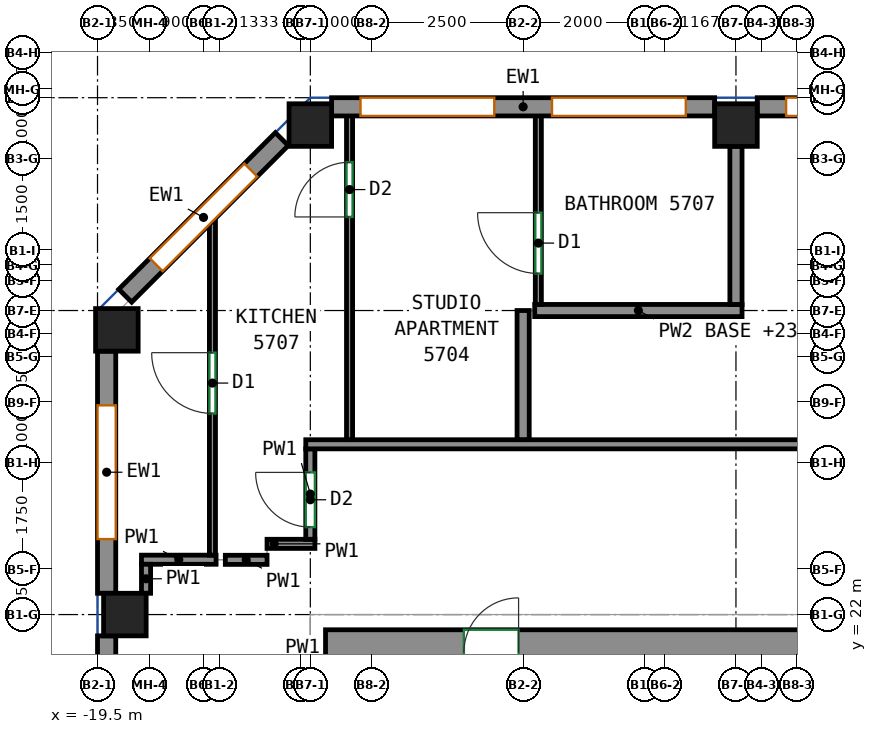
"""IFC4 building model, lengths in metres.
Left out: names, types, materials, properties, quantities, classifications, styles, units other than length and angle.
Written with IfcOpenShell. Run it as: python <this file> out.ifc"""

import sys

from ifc_helpers import new_model, si_unit, direction, frame, frame_2d, origin, origin_2d, place, context, subcontext, project, spatial, rectangle, extrude, source, transform, mapped, element, fill, save


model = new_model("IFC4")
c1 = context("Model", 3, precision=1e-05, world=origin(), true_north=direction((0.0, 1.0)))
c2 = subcontext(c1, "Body", "Model", "MODEL_VIEW")
j1 = project(units=[si_unit("LENGTHUNIT", "METRE"), si_unit("PLANEANGLEUNIT", "RADIAN")], contexts=[c1])
p1 = place(None, origin())
s1 = spatial("IfcSite", under=j1, at=p1, CompositionType="ELEMENT")
p2 = place(p1, origin())
s2 = spatial("IfcBuilding", under=s1, at=p2, CompositionType="ELEMENT")
p3 = place(p2, frame((0.0, 0.0, 239.0)))
s3 = spatial("IfcBuildingStorey", under=s2, at=p3, CompositionType="ELEMENT", Elevation=239.0)
m1 = source(origin(), c2, "Body", "SweptSolid", [
    extrude(rectangle(XDim=0.7, YDim=0.7, at=origin_2d()), origin(), (0.0, 0.0, 1.0), 3.12),
])
for number, where, z_axis, x_axis in (
    (1, (-19.182, 26.682, 0.0), (0.0, 0.0, 1.0), (1.0, 0.0, 0.0)),
    (2, (-19.05, 22.0, 0.0), (0.0, 0.0, 1.0), (1.0, 0.0, 0.0)),
    (3, (-16.0, 30.05, 0.0), (0.0, 0.0, 1.0), (1.0, 0.0, 0.0)),
    (4, (-9.0, 30.05, 0.0), (0.0, 0.0, 1.0), (1.0, 0.0, 0.0)),
):
    element("IfcColumn", number, at=place(p3, frame(where, z_axis=z_axis, x_axis=x_axis)), inside=s3, PredefinedType="COLUMN", context=c2, shape_type="MappedRepresentation", body=[
        mapped(m1, transform((0.0, 0.0, 0.0))),
    ])
m2 = source(origin(), c2, "Body", "SweptSolid", [
    extrude(rectangle(XDim=33.6, YDim=0.75, at=frame_2d((16.8, 0.0))), origin(), (0.0, 0.0, 1.0), 3.12),
])
p4 = place(p3, frame((-15.75, 21.375, 0.0), z_axis=(0.0, 0.0, 1.0), x_axis=(1.0, 0.0, 0.0)))
e5 = element("IfcWall", 5, at=p4, inside=s3, PredefinedType="SHEAR", context=c2, shape_type="MappedRepresentation", body=[
    mapped(m2, transform((0.0, 0.0, 0.0))),
])
p5 = place(p4, frame((8.27, 0.0, 0.0)))
e6 = element("IfcOpeningElement", 6, at=p5, cuts=e5, PredefinedType="OPENING", context=c2, shape_type="SweptSolid", body=[
    extrude(rectangle(XDim=0.9, YDim=2.1, at=frame_2d((0.45, 1.05))), frame((0.0, 0.385, 0.0), z_axis=(0.0, -1.0, 0.0), x_axis=(1.0, 0.0, 0.0)), (0.0, 0.0, 1.0), 0.77),
])
p6 = place(p4, frame((14.97, 0.0, 0.0)))
e7 = element("IfcOpeningElement", 7, at=p6, cuts=e5, PredefinedType="OPENING", context=c2, shape_type="SweptSolid", body=[
    extrude(rectangle(XDim=0.9, YDim=2.1, at=frame_2d((0.45, 1.05))), frame((0.0, 0.385, 0.0), z_axis=(0.0, -1.0, 0.0), x_axis=(1.0, 0.0, 0.0)), (0.0, 0.0, 1.0), 0.77),
])
p7 = place(p4, frame((19.794, 0.0, 0.0)))
e8 = element("IfcOpeningElement", 8, at=p7, cuts=e5, PredefinedType="OPENING", context=c2, shape_type="SweptSolid", body=[
    extrude(rectangle(XDim=0.9, YDim=2.1, at=frame_2d((0.45, 1.05))), frame((0.0, 0.385, 0.0), z_axis=(0.0, -1.0, 0.0), x_axis=(1.0, 0.0, 0.0)), (0.0, 0.0, 1.0), 0.77),
])
p8 = place(p4, frame((25.154, 0.0, 0.0)))
e9 = element("IfcOpeningElement", 9, at=p8, cuts=e5, PredefinedType="OPENING", context=c2, shape_type="SweptSolid", body=[
    extrude(rectangle(XDim=0.9, YDim=2.1, at=frame_2d((0.45, 1.05))), frame((0.0, 0.385, 0.0), z_axis=(0.0, -1.0, 0.0), x_axis=(1.0, 0.0, 0.0)), (0.0, 0.0, 1.0), 0.77),
])
p9 = place(p4, frame((2.275, 0.0, 0.0)))
e10 = element("IfcOpeningElement", 10, at=p9, cuts=e5, PredefinedType="OPENING", context=c2, shape_type="SweptSolid", body=[
    extrude(rectangle(XDim=0.9, YDim=2.1, at=frame_2d((0.45, 1.05))), frame((0.0, 0.385, 0.0), z_axis=(0.0, -1.0, 0.0), x_axis=(1.0, 0.0, 0.0)), (0.0, 0.0, 1.0), 0.77),
])
p10 = place(p4, frame((30.425, 0.0, 0.0)))
e11 = element("IfcOpeningElement", 11, at=p10, cuts=e5, PredefinedType="OPENING", context=c2, shape_type="SweptSolid", body=[
    extrude(rectangle(XDim=0.9, YDim=2.1, at=frame_2d((0.45, 1.05))), frame((0.0, 0.385, 0.0), z_axis=(0.0, -1.0, 0.0), x_axis=(1.0, 0.0, 0.0)), (0.0, 0.0, 1.0), 0.77),
])
m3 = source(origin(), c2, "Body", "SweptSolid", [
    extrude(rectangle(XDim=6.3, YDim=0.3, at=frame_2d((3.15, 0.0))), origin(), (0.0, 0.0, 1.0), 3.12),
])
p11 = place(p3, frame((-2.35, 30.35, 0.0), z_axis=(0.0, 0.0, 1.0), x_axis=(-1.0, 0.0, 0.0)))
e12 = element("IfcWall", 12, at=p11, inside=s3, PredefinedType="SOLIDWALL", context=c2, shape_type="MappedRepresentation", body=[
    mapped(m3, transform((0.0, 0.0, 0.0))),
])
p12 = place(p11, frame((0.475, 0.0, 0.8)))
e13 = element("IfcOpeningElement", 13, at=p12, cuts=e12, PredefinedType="OPENING", context=c2, shape_type="SweptSolid", body=[
    extrude(rectangle(XDim=2.2, YDim=2.05, at=frame_2d((1.1, 1.025))), frame((0.0, 0.16, 0.0), z_axis=(0.0, -1.0, 0.0), x_axis=(1.0, 0.0, 0.0)), (0.0, 0.0, 1.0), 0.32),
])
p13 = place(p11, frame((3.625, 0.0, 0.8)))
e14 = element("IfcOpeningElement", 14, at=p13, cuts=e12, PredefinedType="OPENING", context=c2, shape_type="SweptSolid", body=[
    extrude(rectangle(XDim=2.2, YDim=2.05, at=frame_2d((1.1, 1.025))), frame((0.0, 0.16, 0.0), z_axis=(0.0, -1.0, 0.0), x_axis=(1.0, 0.0, 0.0)), (0.0, 0.0, 1.0), 0.32),
])
p14 = place(p3, frame((-9.35, 30.35, 0.0), z_axis=(0.0, 0.0, 1.0), x_axis=(-1.0, 0.0, 0.0)))
e15 = element("IfcWall", 15, at=p14, inside=s3, PredefinedType="SOLIDWALL", context=c2, shape_type="MappedRepresentation", body=[
    mapped(m3, transform((0.0, 0.0, 0.0))),
])
p15 = place(p14, frame((0.475, 0.0, 0.8)))
e16 = element("IfcOpeningElement", 16, at=p15, cuts=e15, PredefinedType="OPENING", context=c2, shape_type="SweptSolid", body=[
    extrude(rectangle(XDim=2.2, YDim=2.05, at=frame_2d((1.1, 1.025))), frame((0.0, 0.16, 0.0), z_axis=(0.0, -1.0, 0.0), x_axis=(1.0, 0.0, 0.0)), (0.0, 0.0, 1.0), 0.32),
])
p16 = place(p14, frame((3.625, 0.0, 0.8)))
e17 = element("IfcOpeningElement", 17, at=p16, cuts=e15, PredefinedType="OPENING", context=c2, shape_type="SweptSolid", body=[
    extrude(rectangle(XDim=2.2, YDim=2.05, at=frame_2d((1.1, 1.025))), frame((0.0, 0.16, 0.0), z_axis=(0.0, -1.0, 0.0), x_axis=(1.0, 0.0, 0.0)), (0.0, 0.0, 1.0), 0.32),
])
m4 = source(origin(), c2, "Body", "SweptSolid", [
    extrude(rectangle(XDim=3.642, YDim=0.3, at=frame_2d((1.821, 0.0))), origin(), (0.0, 0.0, 1.0), 3.12),
])
p17 = place(p3, frame((-16.469, 29.819, 0.0), z_axis=(0.0, 0.0, 1.0), x_axis=(-0.707106781187, -0.707106781187, 0.0)))
e18 = element("IfcWall", 18, at=p17, inside=s3, PredefinedType="SOLIDWALL", context=c2, shape_type="MappedRepresentation", body=[
    mapped(m4, transform((0.0, 0.0, 0.0))),
])
p18 = place(p17, frame((0.721, 0.0, 0.8)))
e19 = element("IfcOpeningElement", 19, at=p18, cuts=e18, PredefinedType="OPENING", context=c2, shape_type="SweptSolid", body=[
    extrude(rectangle(XDim=2.2, YDim=2.05, at=frame_2d((1.1, 1.025))), frame((0.0, 0.16, 0.0), z_axis=(0.0, -1.0, 0.0), x_axis=(1.0, 0.0, 0.0)), (0.0, 0.0, 1.0), 0.32),
])
m5 = source(origin(), c2, "Body", "SweptSolid", [
    extrude(rectangle(XDim=3.982, YDim=0.3, at=frame_2d((1.991, 0.0))), origin(), (0.0, 0.0, 1.0), 3.12),
])
p19 = place(p3, frame((-19.35, 26.332, 0.0), z_axis=(0.0, 0.0, 1.0), x_axis=(0.0, -1.0, 0.0)))
e20 = element("IfcWall", 20, at=p19, inside=s3, PredefinedType="SOLIDWALL", context=c2, shape_type="MappedRepresentation", body=[
    mapped(m5, transform((0.0, 0.0, 0.0))),
])
p20 = place(p19, frame((0.891, 0.0, 0.8)))
e21 = element("IfcOpeningElement", 21, at=p20, cuts=e20, PredefinedType="OPENING", context=c2, shape_type="SweptSolid", body=[
    extrude(rectangle(XDim=2.2, YDim=2.05, at=frame_2d((1.1, 1.025))), frame((0.0, 0.16, 0.0), z_axis=(0.0, -1.0, 0.0), x_axis=(1.0, 0.0, 0.0)), (0.0, 0.0, 1.0), 0.32),
])
m6 = source(origin(), c2, "Body", "SweptSolid", [
    extrude(rectangle(XDim=13.3, YDim=0.3, at=frame_2d((6.65, 0.0))), origin(), (0.0, 0.0, 1.0), 3.12),
])
p21 = place(p3, frame((-19.35, 21.65, 0.0), z_axis=(0.0, 0.0, 1.0), x_axis=(0.0, -1.0, 0.0)))
e22 = element("IfcWall", 22, at=p21, inside=s3, PredefinedType="SOLIDWALL", context=c2, shape_type="MappedRepresentation", body=[
    mapped(m6, transform((0.0, 0.0, 0.0))),
])
p22 = place(p21, frame((0.562, 0.0, 0.8)))
e23 = element("IfcOpeningElement", 23, at=p22, cuts=e22, PredefinedType="OPENING", context=c2, shape_type="SweptSolid", body=[
    extrude(rectangle(XDim=2.2, YDim=2.05, at=frame_2d((1.1, 1.025))), frame((0.0, 0.16, 0.0), z_axis=(0.0, -1.0, 0.0), x_axis=(1.0, 0.0, 0.0)), (0.0, 0.0, 1.0), 0.32),
])
p23 = place(p21, frame((3.887, 0.0, 0.8)))
e24 = element("IfcOpeningElement", 24, at=p23, cuts=e22, PredefinedType="OPENING", context=c2, shape_type="SweptSolid", body=[
    extrude(rectangle(XDim=2.2, YDim=2.05, at=frame_2d((1.1, 1.025))), frame((0.0, 0.16, 0.0), z_axis=(0.0, -1.0, 0.0), x_axis=(1.0, 0.0, 0.0)), (0.0, 0.0, 1.0), 0.32),
])
p24 = place(p21, frame((7.212, 0.0, 0.8)))
e25 = element("IfcOpeningElement", 25, at=p24, cuts=e22, PredefinedType="OPENING", context=c2, shape_type="SweptSolid", body=[
    extrude(rectangle(XDim=2.2, YDim=2.05, at=frame_2d((1.1, 1.025))), frame((0.0, 0.16, 0.0), z_axis=(0.0, -1.0, 0.0), x_axis=(1.0, 0.0, 0.0)), (0.0, 0.0, 1.0), 0.32),
])
p25 = place(p21, frame((10.538, 0.0, 0.8)))
e26 = element("IfcOpeningElement", 26, at=p25, cuts=e22, PredefinedType="OPENING", context=c2, shape_type="SweptSolid", body=[
    extrude(rectangle(XDim=2.2, YDim=2.05, at=frame_2d((1.1, 1.025))), frame((0.0, 0.16, 0.0), z_axis=(0.0, -1.0, 0.0), x_axis=(1.0, 0.0, 0.0)), (0.0, 0.0, 1.0), 0.32),
])
p26 = place(p3, frame((-17.55, 22.902, 0.0), z_axis=(0.0, 0.0, 1.0), x_axis=(-1.0, 0.0, 0.0)))
e27 = element("IfcWall", 27, at=p26, inside=s3, PredefinedType="PARTITIONING", context=c2, shape_type="SweptSolid", body=[
    extrude(rectangle(XDim=1.227, YDim=0.15, at=frame_2d((0.614, 0.0))), origin(), (0.0, 0.0, 1.0), 3.12),
])
p27 = place(p3, frame((-18.702, 22.827, 0.0), z_axis=(0.0, 0.0, 1.0), x_axis=(0.0, -1.0, 0.0)))
e28 = element("IfcWall", 28, at=p27, inside=s3, PredefinedType="PARTITIONING", context=c2, shape_type="SweptSolid", body=[
    extrude(rectangle(XDim=0.477, YDim=0.15, at=frame_2d((0.238, 0.0))), origin(), (0.0, 0.0, 1.0), 3.12),
])
p28 = place(p3, frame((-16.712, 22.9, 0.0), z_axis=(0.0, 0.0, 1.0), x_axis=(-1.0, 0.0, 0.0)))
e29 = element("IfcWall", 29, at=p28, inside=s3, PredefinedType="PARTITIONING", context=c2, shape_type="SweptSolid", body=[
    extrude(rectangle(XDim=0.686, YDim=0.15, at=frame_2d((0.343, 0.0))), origin(), (0.0, 0.0, 1.0), 3.12),
])
p29 = place(p3, frame((-15.925, 23.163, 0.0), z_axis=(0.0, 0.0, 1.0), x_axis=(-1.0, 0.0, 0.0)))
e30 = element("IfcWall", 30, at=p29, inside=s3, PredefinedType="PARTITIONING", context=c2, shape_type="SweptSolid", body=[
    extrude(rectangle(XDim=0.787, YDim=0.15, at=frame_2d((0.394, 0.0))), origin(), (0.0, 0.0, 1.0), 3.12),
])
p30 = place(p3, frame((-16.0, 23.238, 0.0), z_axis=(0.0, 0.0, 1.0), x_axis=(0.0, 1.0, 0.0)))
e31 = element("IfcWall", 31, at=p30, inside=s3, PredefinedType="PARTITIONING", context=c2, shape_type="SweptSolid", body=[
    extrude(rectangle(XDim=1.487, YDim=0.15, at=frame_2d((0.744, 0.0))), origin(), (0.0, 0.0, 1.0), 3.12),
])
p31 = place(p30, frame((0.2, 0.0, 0.0)))
e32 = element("IfcOpeningElement", 32, at=p31, cuts=e31, PredefinedType="OPENING", context=c2, shape_type="SweptSolid", body=[
    extrude(rectangle(XDim=0.9, YDim=2.1, at=frame_2d((0.45, 1.05))), frame((0.0, 0.085, 0.0), z_axis=(0.0, -1.0, 0.0), x_axis=(1.0, 0.0, 0.0)), (0.0, 0.0, 1.0), 0.17),
])
p32 = place(p3, frame((-16.075, 24.8, 0.0), z_axis=(0.0, 0.0, 1.0), x_axis=(1.0, 0.0, 0.0)))
e33 = element("IfcWall", 33, at=p32, inside=s3, PredefinedType="PARTITIONING", context=c2, shape_type="SweptSolid", body=[
    extrude(rectangle(XDim=36.073, YDim=0.15, at=frame_2d((18.037, 0.0))), origin(), (0.0, 0.0, 1.0), 3.12),
])
p33 = place(p32, frame((14.274, 0.0, 0.0)))
e34 = element("IfcOpeningElement", 34, at=p33, cuts=e33, PredefinedType="OPENING", context=c2, shape_type="SweptSolid", body=[
    extrude(rectangle(XDim=0.9, YDim=2.1, at=frame_2d((0.45, 1.05))), frame((0.0, 0.085, 0.0), z_axis=(0.0, -1.0, 0.0), x_axis=(1.0, 0.0, 0.0)), (0.0, 0.0, 1.0), 0.17),
])
p34 = place(p32, frame((28.875, 0.0, 0.0)))
e35 = element("IfcOpeningElement", 35, at=p34, cuts=e33, PredefinedType="OPENING", context=c2, shape_type="SweptSolid", body=[
    extrude(rectangle(XDim=1.0, YDim=2.1, at=frame_2d((0.5, 1.05))), frame((0.0, 0.085, 0.0), z_axis=(0.0, -1.0, 0.0), x_axis=(1.0, 0.0, 0.0)), (0.0, 0.0, 1.0), 0.17),
])
p35 = place(p3, frame((-12.5, 27.0, 0.0), z_axis=(0.0, 0.0, 1.0), x_axis=(0.0, -1.0, 0.0)))
e36 = element("IfcWall", 36, at=p35, inside=s3, PredefinedType="PARTITIONING", context=c2, shape_type="SweptSolid", body=[
    extrude(rectangle(XDim=2.123, YDim=0.2, at=frame_2d((1.062, 0.0))), origin(), (0.0, 0.0, 1.0), 3.12),
])
p36 = place(p3, frame((-8.9, 27.0, 0.0), z_axis=(0.0, 0.0, 1.0), x_axis=(-1.0, 0.0, 0.0)))
e37 = element("IfcWall", 37, at=p36, inside=s3, PredefinedType="PARTITIONING", context=c2, shape_type="SweptSolid", body=[
    extrude(rectangle(XDim=3.41, YDim=0.2, at=frame_2d((1.705, 0.0))), origin(), (0.0, 0.0, 1.0), 2.57),
])
p37 = place(p3, frame((-9.0, 27.1, 0.0), z_axis=(0.0, 0.0, 1.0), x_axis=(0.0, 1.0, 0.0)))
e38 = element("IfcWall", 38, at=p37, inside=s3, PredefinedType="PARTITIONING", context=c2, shape_type="SweptSolid", body=[
    extrude(rectangle(XDim=2.6, YDim=0.2, at=frame_2d((1.3, 0.0))), origin(), (0.0, 0.0, 1.0), 3.12),
])
p38 = place(p3, frame((-17.61, 22.977, 0.0), z_axis=(0.0, 0.0, 1.0), x_axis=(0.0, 1.0, 0.0)))
e39 = element("IfcWall", 39, at=p38, inside=s3, PredefinedType="PARTITIONING", context=c2, shape_type="SweptSolid", body=[
    extrude(rectangle(XDim=5.559, YDim=0.1, at=frame_2d((2.779, 0.0))), origin(), (0.0, 0.0, 1.0), 3.12),
])
p39 = place(p38, frame((2.33, 0.0, 0.0)))
e40 = element("IfcOpeningElement", 40, at=p39, cuts=e39, PredefinedType="OPENING", context=c2, shape_type="SweptSolid", body=[
    extrude(rectangle(XDim=1.0, YDim=2.1, at=frame_2d((0.5, 1.05))), frame((0.0, 0.06, 0.0), z_axis=(0.0, -1.0, 0.0), x_axis=(1.0, 0.0, 0.0)), (0.0, 0.0, 1.0), 0.12),
])
p40 = place(p3, frame((-15.355, 24.877, 0.0), z_axis=(0.0, 0.0, 1.0), x_axis=(0.0, 1.0, 0.0)))
e41 = element("IfcWall", 41, at=p40, inside=s3, PredefinedType="PARTITIONING", context=c2, shape_type="SweptSolid", body=[
    extrude(rectangle(XDim=5.373, YDim=0.1, at=frame_2d((2.687, 0.0))), origin(), (0.0, 0.0, 1.0), 3.12),
])
p41 = place(p40, frame((3.662, 0.0, 0.0)))
e42 = element("IfcOpeningElement", 42, at=p41, cuts=e41, PredefinedType="OPENING", context=c2, shape_type="SweptSolid", body=[
    extrude(rectangle(XDim=0.9, YDim=2.1, at=frame_2d((0.45, 1.05))), frame((0.0, 0.06, 0.0), z_axis=(0.0, -1.0, 0.0), x_axis=(1.0, 0.0, 0.0)), (0.0, 0.0, 1.0), 0.12),
])
p42 = place(p3, frame((-12.25, 27.1, 0.0), z_axis=(0.0, 0.0, 1.0), x_axis=(0.0, 1.0, 0.0)))
e43 = element("IfcWall", 43, at=p42, inside=s3, PredefinedType="PARTITIONING", context=c2, shape_type="SweptSolid", body=[
    extrude(rectangle(XDim=3.15, YDim=0.1, at=frame_2d((1.575, 0.0))), origin(), (0.0, 0.0, 1.0), 3.12),
])
p43 = place(p42, frame((0.509, 0.0, 0.0)))
e44 = element("IfcOpeningElement", 44, at=p43, cuts=e43, PredefinedType="OPENING", context=c2, shape_type="SweptSolid", body=[
    extrude(rectangle(XDim=1.0, YDim=2.1, at=frame_2d((0.5, 1.05))), frame((0.0, 0.06, 0.0), z_axis=(0.0, -1.0, 0.0), x_axis=(1.0, 0.0, 0.0)), (0.0, 0.0, 1.0), 0.12),
])
p44 = place(p13, origin())
e45 = element("IfcWindow", 45, at=p44, inside=s3, PartitioningType="SINGLE_PANEL", PredefinedType="WINDOW", context=c2, shape_type="SweptSolid", body=[
    extrude(rectangle(XDim=2.2, YDim=2.05, at=frame_2d((1.1, 1.025))), frame((0.0, 0.03, 0.0), z_axis=(0.0, -1.0, 0.0), x_axis=(1.0, 0.0, 0.0)), (0.0, 0.0, 1.0), 0.06),
])
fill(e14, e45)
p45 = place(p15, origin())
e46 = element("IfcWindow", 46, at=p45, inside=s3, PartitioningType="SINGLE_PANEL", PredefinedType="WINDOW", context=c2, shape_type="SweptSolid", body=[
    extrude(rectangle(XDim=2.2, YDim=2.05, at=frame_2d((1.1, 1.025))), frame((0.0, 0.03, 0.0), z_axis=(0.0, -1.0, 0.0), x_axis=(1.0, 0.0, 0.0)), (0.0, 0.0, 1.0), 0.06),
])
fill(e16, e46)
p46 = place(p16, origin())
e47 = element("IfcWindow", 47, at=p46, inside=s3, PartitioningType="SINGLE_PANEL", PredefinedType="WINDOW", context=c2, shape_type="SweptSolid", body=[
    extrude(rectangle(XDim=2.2, YDim=2.05, at=frame_2d((1.1, 1.025))), frame((0.0, 0.03, 0.0), z_axis=(0.0, -1.0, 0.0), x_axis=(1.0, 0.0, 0.0)), (0.0, 0.0, 1.0), 0.06),
])
fill(e17, e47)
p47 = place(p18, origin())
e48 = element("IfcWindow", 48, at=p47, inside=s3, PartitioningType="SINGLE_PANEL", PredefinedType="WINDOW", context=c2, shape_type="SweptSolid", body=[
    extrude(rectangle(XDim=2.2, YDim=2.05, at=frame_2d((1.1, 1.025))), frame((0.0, 0.03, 0.0), z_axis=(0.0, -1.0, 0.0), x_axis=(1.0, 0.0, 0.0)), (0.0, 0.0, 1.0), 0.06),
])
fill(e19, e48)
p48 = place(p20, origin())
e49 = element("IfcWindow", 49, at=p48, inside=s3, PartitioningType="SINGLE_PANEL", PredefinedType="WINDOW", context=c2, shape_type="SweptSolid", body=[
    extrude(rectangle(XDim=2.2, YDim=2.05, at=frame_2d((1.1, 1.025))), frame((0.0, 0.03, 0.0), z_axis=(0.0, -1.0, 0.0), x_axis=(1.0, 0.0, 0.0)), (0.0, 0.0, 1.0), 0.06),
])
fill(e21, e49)
p49 = place(p31, origin())
e50 = element("IfcDoor", 50, at=p49, inside=s3, OperationType="SINGLE_SWING_RIGHT", PredefinedType="DOOR", context=c2, shape_type="SweptSolid", body=[
    extrude(rectangle(XDim=0.9, YDim=2.1, at=frame_2d((0.45, 1.05))), frame((0.0, 0.025, 0.0), z_axis=(0.0, -1.0, 0.0), x_axis=(1.0, 0.0, 0.0)), (0.0, 0.0, 1.0), 0.05),
])
fill(e32, e50)
p50 = place(p39, origin())
e51 = element("IfcDoor", 51, at=p50, inside=s3, OperationType="SINGLE_SWING_RIGHT", PredefinedType="DOOR", context=c2, shape_type="SweptSolid", body=[
    extrude(rectangle(XDim=1.0, YDim=2.1, at=frame_2d((0.5, 1.05))), frame((0.0, 0.025, 0.0), z_axis=(0.0, -1.0, 0.0), x_axis=(1.0, 0.0, 0.0)), (0.0, 0.0, 1.0), 0.05),
])
fill(e40, e51)
p51 = place(p43, origin())
e52 = element("IfcDoor", 52, at=p51, inside=s3, OperationType="SINGLE_SWING_RIGHT", PredefinedType="DOOR", context=c2, shape_type="SweptSolid", body=[
    extrude(rectangle(XDim=1.0, YDim=2.1, at=frame_2d((0.5, 1.05))), frame((0.0, 0.025, 0.0), z_axis=(0.0, -1.0, 0.0), x_axis=(1.0, 0.0, 0.0)), (0.0, 0.0, 1.0), 0.05),
])
fill(e44, e52)
p52 = place(p41, origin())
e53 = element("IfcDoor", 53, at=p52, inside=s3, OperationType="SINGLE_SWING_LEFT", PredefinedType="DOOR", context=c2, shape_type="SweptSolid", body=[
    extrude(rectangle(XDim=0.9, YDim=2.1, at=frame_2d((0.45, 1.05))), frame((0.0, 0.025, 0.0), z_axis=(0.0, -1.0, 0.0), x_axis=(1.0, 0.0, 0.0)), (0.0, 0.0, 1.0), 0.05),
])
fill(e42, e53)
save(model, sys.argv[1])
